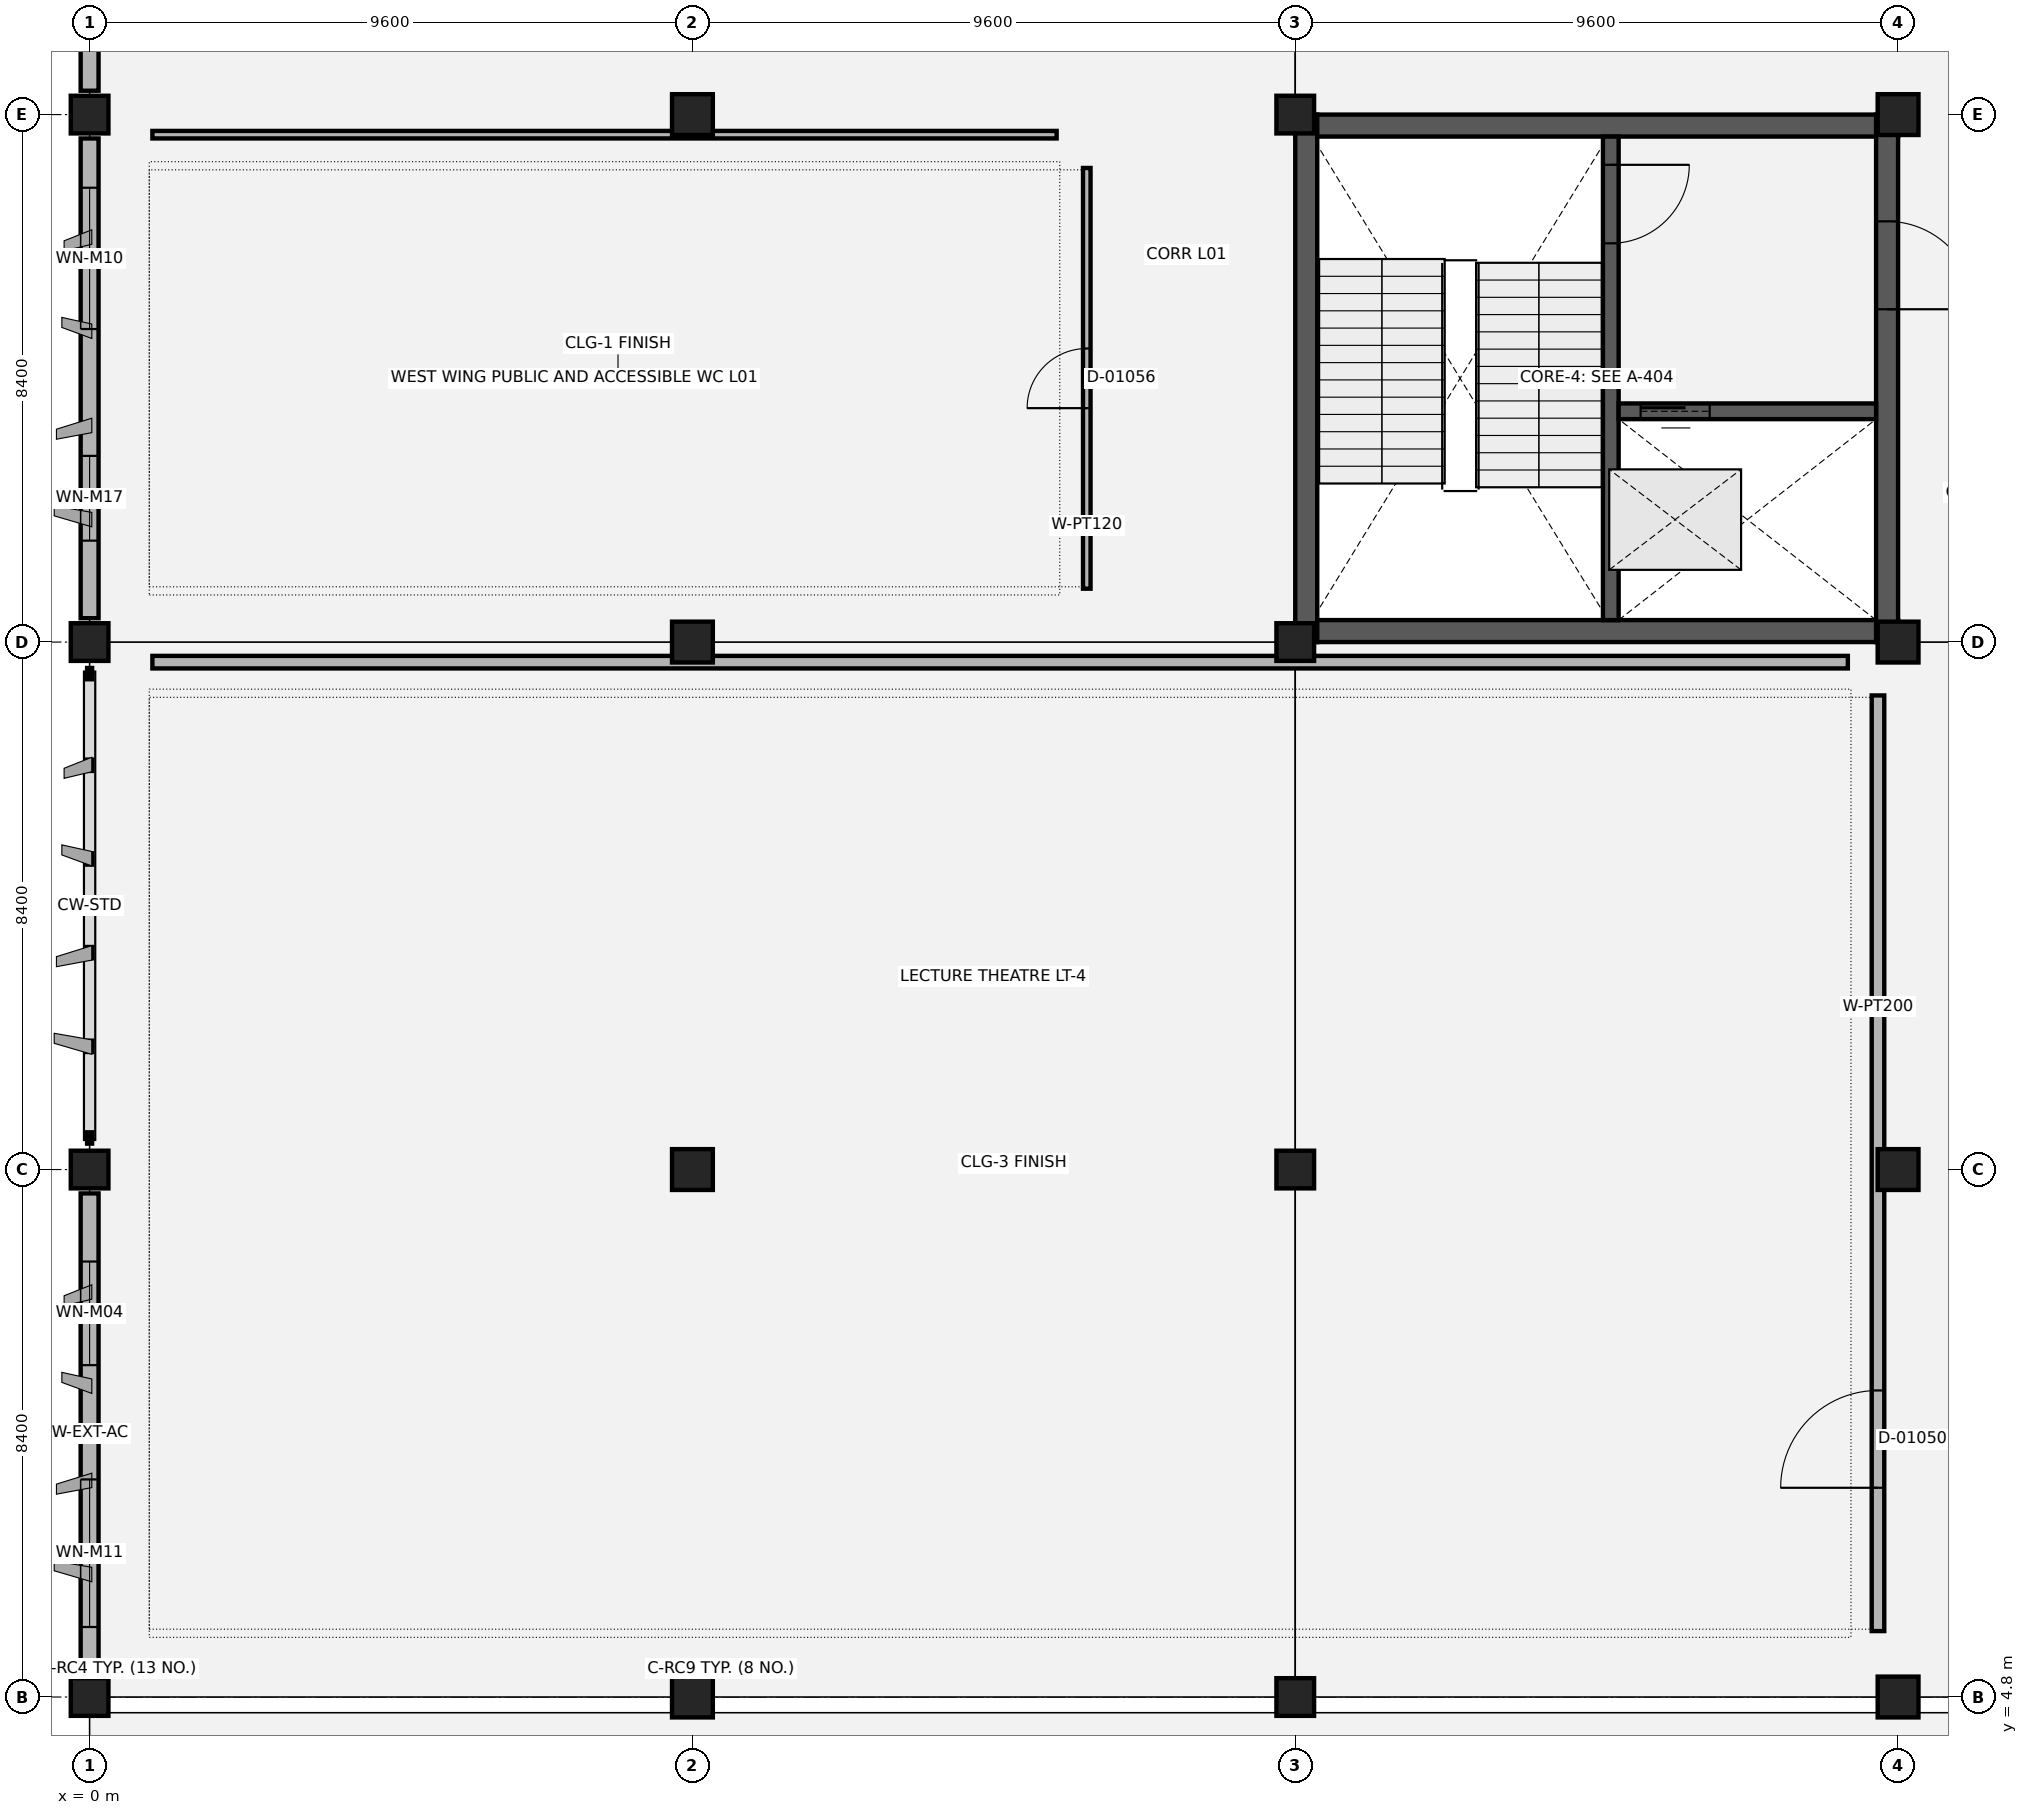
"""IFC4 building model, lengths in metres.
Left out: names, types, materials, properties, quantities, classifications, styles, units other than length and angle.
Written with IfcOpenShell. Run it as: python <this file> out.ifc"""

import sys

from ifc_helpers import new_model, si_unit, direction, frame, frame_2d, origin, origin_2d, place, context, subcontext, project, spatial, rectangle, extrude, element, fill, save


model = new_model("IFC4")
c1 = context("Model", 3, precision=1e-05, world=origin(), true_north=direction((0.0, 1.0)))
c2 = subcontext(c1, "Body", "Model", "MODEL_VIEW")
j1 = project(units=[si_unit("LENGTHUNIT", "METRE"), si_unit("PLANEANGLEUNIT", "RADIAN")], contexts=[c1])
p1 = place(None, origin())
s1 = spatial("IfcSite", under=j1, at=p1, CompositionType="ELEMENT")
p2 = place(p1, origin())
s2 = spatial("IfcBuilding", under=s1, at=p2, CompositionType="ELEMENT")
p3 = place(p2, frame((0.0, 0.0, 5.4)))
s3 = spatial("IfcBuildingStorey", under=s2, at=p3, CompositionType="ELEMENT", Elevation=5.4)
for number, where, z_axis, x_axis in (
    (1, (0.0, 4.8, 0.0), (0.0, 0.0, 1.0), (1.0, 0.0, 0.0)),
    (2, (0.0, 13.2, 0.0), (0.0, 0.0, 1.0), (1.0, 0.0, 0.0)),
    (3, (0.0, 21.6, 0.0), (0.0, 0.0, 1.0), (1.0, 0.0, 0.0)),
    (4, (0.0, 30.0, 0.0), (0.0, 0.0, 1.0), (1.0, 0.0, 0.0)),
):
    element("IfcColumn", number, at=place(p3, frame(where, z_axis=z_axis, x_axis=x_axis)), inside=s3, PredefinedType="COLUMN", context=c2, shape_type="SweptSolid", body=[
        extrude(rectangle(XDim=0.6, YDim=0.6, at=origin_2d()), origin(), (0.0, 0.0, 1.0), 4.8),
    ])
for number, where, z_axis, x_axis in (
    (5, (9.6, 4.8, 0.0), (0.0, 0.0, 1.0), (1.0, 0.0, 0.0)),
    (6, (9.6, 13.2, 0.0), (0.0, 0.0, 1.0), (1.0, 0.0, 0.0)),
    (7, (9.6, 21.6, 0.0), (0.0, 0.0, 1.0), (1.0, 0.0, 0.0)),
    (8, (9.6, 30.0, 0.0), (0.0, 0.0, 1.0), (1.0, 0.0, 0.0)),
):
    element("IfcColumn", number, at=place(p3, frame(where, z_axis=z_axis, x_axis=x_axis)), inside=s3, PredefinedType="COLUMN", context=c2, shape_type="SweptSolid", body=[
        extrude(rectangle(XDim=0.65, YDim=0.65, at=origin_2d()), origin(), (0.0, 0.0, 1.0), 4.8),
    ])
for number, where, z_axis, x_axis in (
    (9, (19.2, 4.8, 0.0), (0.0, 0.0, 1.0), (1.0, 0.0, 0.0)),
    (10, (19.2, 13.2, 0.0), (0.0, 0.0, 1.0), (1.0, 0.0, 0.0)),
    (11, (19.2, 21.6, 0.0), (0.0, 0.0, 1.0), (1.0, 0.0, 0.0)),
    (12, (19.2, 30.0, 0.0), (0.0, 0.0, 1.0), (1.0, 0.0, 0.0)),
):
    element("IfcColumn", number, at=place(p3, frame(where, z_axis=z_axis, x_axis=x_axis)), inside=s3, PredefinedType="COLUMN", context=c2, shape_type="SweptSolid", body=[
        extrude(rectangle(XDim=0.6, YDim=0.6, at=origin_2d()), origin(), (0.0, 0.0, 1.0), 4.8),
    ])
for number, where, z_axis, x_axis in (
    (13, (28.8, 4.8, 0.0), (0.0, 0.0, 1.0), (1.0, 0.0, 0.0)),
    (14, (28.8, 13.2, 0.0), (0.0, 0.0, 1.0), (1.0, 0.0, 0.0)),
    (15, (28.8, 21.6, 0.0), (0.0, 0.0, 1.0), (1.0, 0.0, 0.0)),
    (16, (28.8, 30.0, 0.0), (0.0, 0.0, 1.0), (1.0, 0.0, 0.0)),
):
    element("IfcColumn", number, at=place(p3, frame(where, z_axis=z_axis, x_axis=x_axis)), inside=s3, PredefinedType="COLUMN", context=c2, shape_type="SweptSolid", body=[
        extrude(rectangle(XDim=0.65, YDim=0.65, at=origin_2d()), origin(), (0.0, 0.0, 1.0), 4.8),
    ])
p4 = place(p3, frame((0.0, 12.82, 0.0), z_axis=(0.0, 0.0, 1.0), x_axis=(0.0, -1.0, 0.0)))
e17 = element("IfcWall", 17, at=p4, inside=s3, PredefinedType="SOLIDWALL", context=c2, shape_type="SweptSolid", body=[
    extrude(rectangle(XDim=7.64, YDim=0.285, at=frame_2d((3.82, 0.0))), origin(), (0.0, 0.0, 1.0), 3.28),
])
p5 = place(p4, frame((1.085, 0.0, 0.9)))
e18 = element("IfcOpeningElement", 18, at=p5, cuts=e17, PredefinedType="OPENING", context=c2, shape_type="SweptSolid", body=[
    extrude(rectangle(XDim=1.65, YDim=1.5, at=frame_2d((0.825, 0.75))), frame((0.0, 0.152, 0.0), z_axis=(0.0, -1.0, 0.0), x_axis=(1.0, 0.0, 0.0)), (0.0, 0.0, 1.0), 0.305),
])
p6 = place(p4, frame((4.555, 0.0, 0.9)))
e19 = element("IfcOpeningElement", 19, at=p6, cuts=e17, PredefinedType="OPENING", context=c2, shape_type="SweptSolid", body=[
    extrude(rectangle(XDim=2.35, YDim=1.7, at=frame_2d((1.175, 0.85))), frame((0.0, 0.152, 0.0), z_axis=(0.0, -1.0, 0.0), x_axis=(1.0, 0.0, 0.0)), (0.0, 0.0, 1.0), 0.305),
])
p7 = place(p3, frame((0.0, 29.62, 0.0), z_axis=(0.0, 0.0, 1.0), x_axis=(0.0, -1.0, 0.0)))
e20 = element("IfcWall", 20, at=p7, inside=s3, PredefinedType="SOLIDWALL", context=c2, shape_type="SweptSolid", body=[
    extrude(rectangle(XDim=7.64, YDim=0.285, at=frame_2d((3.82, 0.0))), origin(), (0.0, 0.0, 1.0), 3.28),
])
p8 = place(p7, frame((0.785, 0.0, 0.9)))
e21 = element("IfcOpeningElement", 21, at=p8, cuts=e20, PredefinedType="OPENING", context=c2, shape_type="SweptSolid", body=[
    extrude(rectangle(XDim=2.25, YDim=1.65, at=frame_2d((1.125, 0.825))), frame((0.0, 0.152, 0.0), z_axis=(0.0, -1.0, 0.0), x_axis=(1.0, 0.0, 0.0)), (0.0, 0.0, 1.0), 0.305),
])
p9 = place(p7, frame((5.055, 0.0, 0.9)))
e22 = element("IfcOpeningElement", 22, at=p9, cuts=e20, PredefinedType="OPENING", context=c2, shape_type="SweptSolid", body=[
    extrude(rectangle(XDim=1.35, YDim=1.35, at=frame_2d((0.675, 0.675))), frame((0.0, 0.152, 0.0), z_axis=(0.0, -1.0, 0.0), x_axis=(1.0, 0.0, 0.0)), (0.0, 0.0, 1.0), 0.305),
])
p10 = place(p3, frame((0.0, 38.02, 0.0), z_axis=(0.0, 0.0, 1.0), x_axis=(0.0, -1.0, 0.0)))
e23 = element("IfcWall", 23, at=p10, inside=s3, PredefinedType="SOLIDWALL", context=c2, shape_type="SweptSolid", body=[
    extrude(rectangle(XDim=7.64, YDim=0.285, at=frame_2d((3.82, 0.0))), origin(), (0.0, 0.0, 1.0), 3.28),
])
p11 = place(p10, frame((0.635, 0.0, 0.9)))
e24 = element("IfcOpeningElement", 24, at=p11, cuts=e23, PredefinedType="OPENING", context=c2, shape_type="SweptSolid", body=[
    extrude(rectangle(XDim=2.55, YDim=1.75, at=frame_2d((1.275, 0.875))), frame((0.0, 0.152, 0.0), z_axis=(0.0, -1.0, 0.0), x_axis=(1.0, 0.0, 0.0)), (0.0, 0.0, 1.0), 0.305),
])
p12 = place(p10, frame((4.73, 0.0, 0.9)))
e25 = element("IfcOpeningElement", 25, at=p12, cuts=e23, PredefinedType="OPENING", context=c2, shape_type="SweptSolid", body=[
    extrude(rectangle(XDim=2.0, YDim=1.55, at=frame_2d((1.0, 0.775))), frame((0.0, 0.152, 0.0), z_axis=(0.0, -1.0, 0.0), x_axis=(1.0, 0.0, 0.0)), (0.0, 0.0, 1.0), 0.305),
])
for number, where, z_axis, x_axis in (
    (26, (19.2, 29.825, 0.0), (0.0, 0.0, 1.0), (1.0, 0.0, 0.0)),
    (27, (19.2, 21.775, 0.0), (0.0, 0.0, 1.0), (1.0, 0.0, 0.0)),
):
    element("IfcWall", number, at=place(p3, frame(where, z_axis=z_axis, x_axis=x_axis)), inside=s3, PredefinedType="SHEAR", context=c2, shape_type="SweptSolid", body=[
        extrude(rectangle(XDim=9.6, YDim=0.35, at=frame_2d((4.8, 0.0))), origin(), (0.0, 0.0, 1.0), 4.48),
    ])
p13 = place(p3, frame((19.375, 21.6, 0.0), z_axis=(0.0, 0.0, 1.0), x_axis=(0.0, 1.0, 0.0)))
e28 = element("IfcWall", 28, at=p13, inside=s3, PredefinedType="SHEAR", context=c2, shape_type="SweptSolid", body=[
    extrude(rectangle(XDim=8.4, YDim=0.35, at=frame_2d((4.2, 0.0))), origin(), (0.0, 0.0, 1.0), 4.48),
])
p14 = place(p3, frame((28.625, 21.6, 0.0), z_axis=(0.0, 0.0, 1.0), x_axis=(0.0, 1.0, 0.0)))
e29 = element("IfcWall", 29, at=p14, inside=s3, PredefinedType="SHEAR", context=c2, shape_type="SweptSolid", body=[
    extrude(rectangle(XDim=8.4, YDim=0.35, at=frame_2d((4.2, 0.0))), origin(), (0.0, 0.0, 1.0), 4.48),
])
p15 = place(p14, frame((5.3, 0.0, 0.0)))
e30 = element("IfcOpeningElement", 30, at=p15, cuts=e29, PredefinedType="OPENING", context=c2, shape_type="SweptSolid", body=[
    extrude(rectangle(XDim=1.4, YDim=2.15, at=frame_2d((0.7, 1.075))), frame((0.0, 0.185, 0.0), z_axis=(0.0, -1.0, 0.0), x_axis=(1.0, 0.0, 0.0)), (0.0, 0.0, 1.0), 0.37),
])
p16 = place(p3, frame((24.225, 29.65, 0.0), z_axis=(0.0, 0.0, 1.0), x_axis=(0.0, -1.0, 0.0)))
e31 = element("IfcWall", 31, at=p16, inside=s3, PredefinedType="SHEAR", context=c2, shape_type="SweptSolid", body=[
    extrude(rectangle(XDim=7.7, YDim=0.25, at=frame_2d((3.85, 0.0))), origin(), (0.0, 0.0, 1.0), 4.48),
])
p17 = place(p16, frame((0.45, 0.0, 0.0)))
e32 = element("IfcOpeningElement", 32, at=p17, cuts=e31, PredefinedType="OPENING", context=c2, shape_type="SweptSolid", body=[
    extrude(rectangle(XDim=1.25, YDim=2.15, at=frame_2d((0.625, 1.075))), frame((0.0, 0.135, 0.0), z_axis=(0.0, -1.0, 0.0), x_axis=(1.0, 0.0, 0.0)), (0.0, 0.0, 1.0), 0.27),
])
p18 = place(p3, frame((24.35, 25.275, 0.0), z_axis=(0.0, 0.0, 1.0), x_axis=(1.0, 0.0, 0.0)))
e33 = element("IfcWall", 33, at=p18, inside=s3, PredefinedType="SHEAR", context=c2, shape_type="SweptSolid", body=[
    extrude(rectangle(XDim=4.1, YDim=0.25, at=frame_2d((2.05, 0.0))), origin(), (0.0, 0.0, 1.0), 4.48),
])
p19 = place(p18, frame((0.35, 0.0, 0.0)))
e34 = element("IfcOpeningElement", 34, at=p19, cuts=e33, PredefinedType="OPENING", context=c2, shape_type="SweptSolid", body=[
    extrude(rectangle(XDim=1.1, YDim=2.15, at=frame_2d((0.55, 1.075))), frame((0.0, 0.135, 0.0), z_axis=(0.0, -1.0, 0.0), x_axis=(1.0, 0.0, 0.0)), (0.0, 0.0, 1.0), 0.27),
])
p20 = place(p3, frame((28.48, 5.85, 0.0), z_axis=(0.0, 0.0, 1.0), x_axis=(0.0, 1.0, 0.0)))
e35 = element("IfcWall", 35, at=p20, inside=s3, PredefinedType="PARTITIONING", context=c2, shape_type="SweptSolid", body=[
    extrude(rectangle(XDim=14.9, YDim=0.2, at=frame_2d((7.45, 0.0))), origin(), (0.0, 0.0, 1.0), 3.26),
])
p21 = place(p20, frame((2.282, 0.0, 0.0)))
e36 = element("IfcOpeningElement", 36, at=p21, cuts=e35, PredefinedType="OPENING", context=c2, shape_type="SweptSolid", body=[
    extrude(rectangle(XDim=1.55, YDim=2.15, at=frame_2d((0.775, 1.075))), frame((0.0, 0.11, 0.0), z_axis=(0.0, -1.0, 0.0), x_axis=(1.0, 0.0, 0.0)), (0.0, 0.0, 1.0), 0.22),
])
p22 = place(p3, frame((1.0, 21.28, 0.0), z_axis=(0.0, 0.0, 1.0), x_axis=(1.0, 0.0, 0.0)))
e37 = element("IfcWall", 37, at=p22, inside=s3, PredefinedType="PARTITIONING", context=c2, shape_type="SweptSolid", body=[
    extrude(rectangle(XDim=27.0, YDim=0.2, at=frame_2d((13.5, 0.0))), origin(), (0.0, 0.0, 1.0), 3.26),
])
p23 = place(p3, frame((15.88, 22.45, 0.0), z_axis=(0.0, 0.0, 1.0), x_axis=(0.0, 1.0, 0.0)))
e38 = element("IfcWall", 38, at=p23, inside=s3, PredefinedType="PARTITIONING", context=c2, shape_type="SweptSolid", body=[
    extrude(rectangle(XDim=6.7, YDim=0.12, at=frame_2d((3.35, 0.0))), origin(), (0.0, 0.0, 1.0), 3.26),
])
p24 = place(p23, frame((2.875, 0.0, 0.0)))
e39 = element("IfcOpeningElement", 39, at=p24, cuts=e38, PredefinedType="OPENING", context=c2, shape_type="SweptSolid", body=[
    extrude(rectangle(XDim=0.95, YDim=2.1, at=frame_2d((0.475, 1.05))), frame((0.0, 0.07, 0.0), z_axis=(0.0, -1.0, 0.0), x_axis=(1.0, 0.0, 0.0)), (0.0, 0.0, 1.0), 0.14),
])
p25 = place(p3, frame((1.0, 29.68, 0.0), z_axis=(0.0, 0.0, 1.0), x_axis=(1.0, 0.0, 0.0)))
e40 = element("IfcWall", 40, at=p25, inside=s3, PredefinedType="PARTITIONING", context=c2, shape_type="SweptSolid", body=[
    extrude(rectangle(XDim=14.4, YDim=0.12, at=frame_2d((7.2, 0.0))), origin(), (0.0, 0.0, 1.0), 3.26),
])
p26 = place(p5, origin())
e41 = element("IfcWindow", 41, at=p26, inside=s3, PartitioningType="SINGLE_PANEL", PredefinedType="WINDOW", context=c2, shape_type="SweptSolid", body=[
    extrude(rectangle(XDim=1.65, YDim=1.5, at=frame_2d((0.825, 0.75))), frame((0.0, 0.03, 0.0), z_axis=(0.0, -1.0, 0.0), x_axis=(1.0, 0.0, 0.0)), (0.0, 0.0, 1.0), 0.06),
])
fill(e18, e41)
p27 = place(p6, origin())
e42 = element("IfcWindow", 42, at=p27, inside=s3, PartitioningType="SINGLE_PANEL", PredefinedType="WINDOW", context=c2, shape_type="SweptSolid", body=[
    extrude(rectangle(XDim=2.35, YDim=1.7, at=frame_2d((1.175, 0.85))), frame((0.0, 0.03, 0.0), z_axis=(0.0, -1.0, 0.0), x_axis=(1.0, 0.0, 0.0)), (0.0, 0.0, 1.0), 0.06),
])
fill(e19, e42)
p28 = place(p8, origin())
e43 = element("IfcWindow", 43, at=p28, inside=s3, PartitioningType="SINGLE_PANEL", PredefinedType="WINDOW", context=c2, shape_type="SweptSolid", body=[
    extrude(rectangle(XDim=2.25, YDim=1.65, at=frame_2d((1.125, 0.825))), frame((0.0, 0.03, 0.0), z_axis=(0.0, -1.0, 0.0), x_axis=(1.0, 0.0, 0.0)), (0.0, 0.0, 1.0), 0.06),
])
fill(e21, e43)
p29 = place(p9, origin())
e44 = element("IfcWindow", 44, at=p29, inside=s3, PartitioningType="SINGLE_PANEL", PredefinedType="WINDOW", context=c2, shape_type="SweptSolid", body=[
    extrude(rectangle(XDim=1.35, YDim=1.35, at=frame_2d((0.675, 0.675))), frame((0.0, 0.03, 0.0), z_axis=(0.0, -1.0, 0.0), x_axis=(1.0, 0.0, 0.0)), (0.0, 0.0, 1.0), 0.06),
])
fill(e22, e44)
p30 = place(p17, origin())
e45 = element("IfcDoor", 45, at=p30, inside=s3, OperationType="SINGLE_SWING_LEFT", PredefinedType="DOOR", context=c2, shape_type="SweptSolid", body=[
    extrude(rectangle(XDim=1.25, YDim=2.15, at=frame_2d((0.625, 1.075))), frame((0.0, 0.025, 0.0), z_axis=(0.0, -1.0, 0.0), x_axis=(1.0, 0.0, 0.0)), (0.0, 0.0, 1.0), 0.05),
])
fill(e32, e45)
p31 = place(p19, origin())
e46 = element("IfcDoor", 46, at=p31, inside=s3, OperationType="SLIDING_TO_LEFT", PredefinedType="DOOR", context=c2, shape_type="SweptSolid", body=[
    extrude(rectangle(XDim=1.1, YDim=2.15, at=frame_2d((0.55, 1.075))), frame((0.0, 0.025, 0.0), z_axis=(0.0, -1.0, 0.0), x_axis=(1.0, 0.0, 0.0)), (0.0, 0.0, 1.0), 0.05),
])
fill(e34, e46)
p32 = place(p15, origin())
e47 = element("IfcDoor", 47, at=p32, inside=s3, OperationType="SINGLE_SWING_RIGHT", PredefinedType="DOOR", context=c2, shape_type="SweptSolid", body=[
    extrude(rectangle(XDim=1.4, YDim=2.15, at=frame_2d((0.7, 1.075))), frame((0.0, 0.025, 0.0), z_axis=(0.0, -1.0, 0.0), x_axis=(1.0, 0.0, 0.0)), (0.0, 0.0, 1.0), 0.05),
])
fill(e30, e47)
p33 = place(p21, origin())
e48 = element("IfcDoor", 48, at=p33, inside=s3, OperationType="SINGLE_SWING_LEFT", PredefinedType="DOOR", context=c2, shape_type="SweptSolid", body=[
    extrude(rectangle(XDim=1.55, YDim=2.15, at=frame_2d((0.775, 1.075))), frame((0.0, 0.025, 0.0), z_axis=(0.0, -1.0, 0.0), x_axis=(1.0, 0.0, 0.0)), (0.0, 0.0, 1.0), 0.05),
])
fill(e36, e48)
p34 = place(p24, origin())
e49 = element("IfcDoor", 49, at=p34, inside=s3, OperationType="SINGLE_SWING_LEFT", PredefinedType="DOOR", context=c2, shape_type="SweptSolid", body=[
    extrude(rectangle(XDim=0.95, YDim=2.1, at=frame_2d((0.475, 1.05))), frame((0.0, 0.025, 0.0), z_axis=(0.0, -1.0, 0.0), x_axis=(1.0, 0.0, 0.0)), (0.0, 0.0, 1.0), 0.05),
])
fill(e39, e49)
save(model, sys.argv[1])
